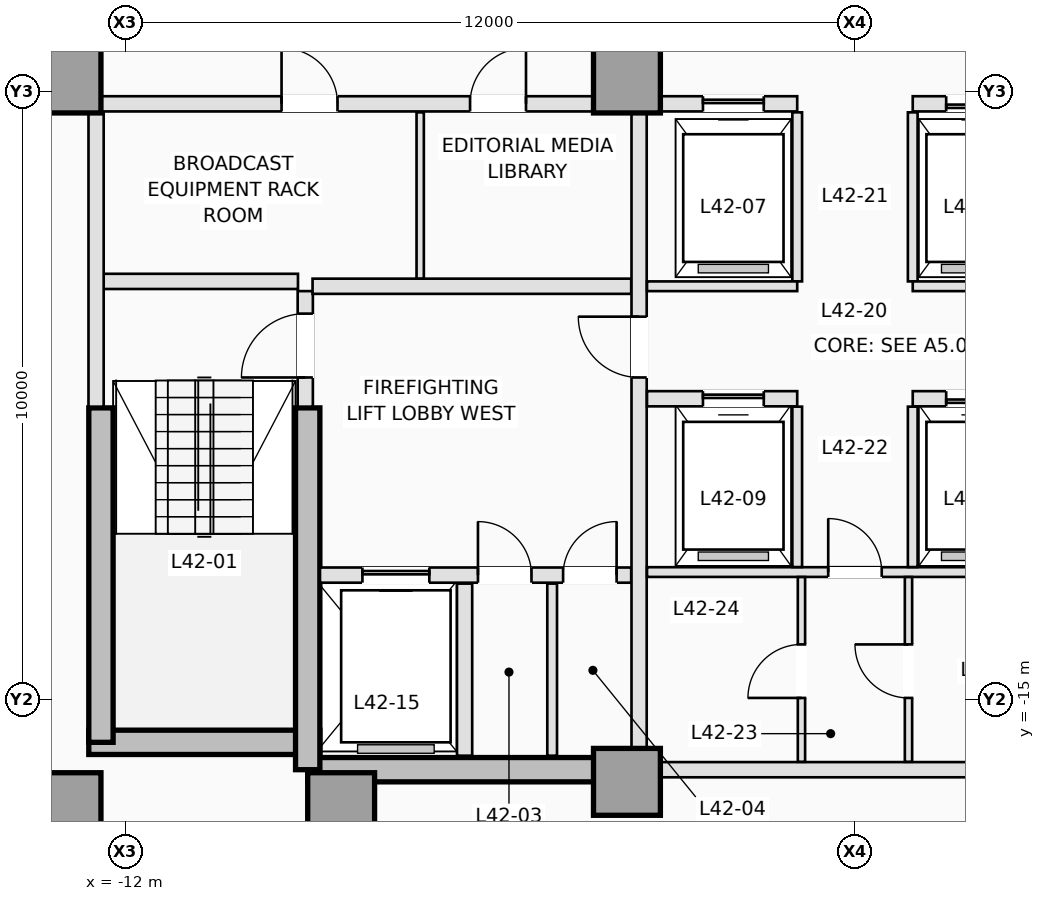
"""IFC4 building model, lengths in metres.
Left out: names, types, materials, properties, quantities, classifications, styles, units other than length and angle.
Written with IfcOpenShell. Run it as: python <this file> out.ifc"""

import sys

from ifc_helpers import new_model, si_unit, direction, frame, frame_2d, origin, origin_2d, place, context, subcontext, project, spatial, rectangle, extrude, element, fill, save


model = new_model("IFC4")
c1 = context("Model", 3, precision=1e-05, world=origin(), true_north=direction((0.0, 1.0)))
c2 = subcontext(c1, "Body", "Model", "MODEL_VIEW")
j1 = project(units=[si_unit("LENGTHUNIT", "METRE"), si_unit("PLANEANGLEUNIT", "RADIAN")], contexts=[c1])
p1 = place(None, origin())
s1 = spatial("IfcSite", under=j1, at=p1, CompositionType="ELEMENT")
p2 = place(p1, origin())
s2 = spatial("IfcBuilding", under=s1, at=p2, CompositionType="ELEMENT")
p3 = place(p2, frame((0.0, 0.0, 154.5)))
s3 = spatial("IfcBuildingStorey", under=s2, at=p3, CompositionType="ELEMENT", Elevation=154.5)
p4 = place(p3, frame((-12.6, -15.7, 0.0), z_axis=(0.0, 0.0, 1.0), x_axis=(1.0, 0.0, 0.0)))
e1 = element("IfcWall", 1, at=p4, inside=s3, PredefinedType="SHEAR", context=c2, shape_type="SweptSolid", body=[
    extrude(rectangle(XDim=3.8, YDim=0.4, at=frame_2d((1.9, 0.0))), origin(), (0.0, 0.0, 1.0), 3.5),
])
p5 = place(p3, frame((-9.0, -16.15, 0.0), z_axis=(0.0, 0.0, 1.0), x_axis=(1.0, 0.0, 0.0)))
e2 = element("IfcWall", 2, at=p5, inside=s3, PredefinedType="SHEAR", context=c2, shape_type="SweptSolid", body=[
    extrude(rectangle(XDim=5.25, YDim=0.4, at=frame_2d((2.625, 0.0))), origin(), (0.0, 0.0, 1.0), 3.5),
])
p6 = place(p3, frame((-12.4, -15.7, 0.0), z_axis=(0.0, 0.0, 1.0), x_axis=(0.0, 1.0, 0.0)))
e3 = element("IfcWall", 3, at=p6, inside=s3, PredefinedType="SHEAR", context=c2, shape_type="SweptSolid", body=[
    extrude(rectangle(XDim=5.5, YDim=0.4, at=frame_2d((2.75, 0.0))), origin(), (0.0, 0.0, 1.0), 3.5),
])
p7 = place(p3, frame((-9.0, -16.15, 0.0), z_axis=(0.0, 0.0, 1.0), x_axis=(0.0, 1.0, 0.0)))
e4 = element("IfcWall", 4, at=p7, inside=s3, PredefinedType="SHEAR", context=c2, shape_type="SweptSolid", body=[
    extrude(rectangle(XDim=5.95, YDim=0.4, at=frame_2d((2.975, 0.0))), origin(), (0.0, 0.0, 1.0), 3.5),
])
for number, where, z_axis, x_axis in (
    (5, (-12.95, -16.75, 0.0), (0.0, 0.0, 1.0), (1.0, 0.0, 0.0)),
    (6, (-8.45, -16.75, 0.0), (0.0, 0.0, 1.0), (1.0, 0.0, 0.0)),
    (7, (-3.75, -16.35, 0.0), (0.0, 0.0, 1.0), (1.0, 0.0, 0.0)),
    (8, (-12.95, -4.8, 0.0), (0.0, 0.0, 1.0), (1.0, 0.0, 0.0)),
    (9, (-3.75, -4.8, 0.0), (0.0, 0.0, 1.0), (1.0, 0.0, 0.0)),
):
    element("IfcColumn", number, at=place(p3, frame(where, z_axis=z_axis, x_axis=x_axis)), inside=s3, PredefinedType="COLUMN", context=c2, shape_type="SweptSolid", body=[
        extrude(rectangle(XDim=1.1, YDim=1.1, at=origin_2d()), origin(), (0.0, 0.0, 1.0), 3.5),
    ])
p8 = place(p3, frame((-9.04, -10.18, 0.0), z_axis=(0.0, 0.0, 1.0), x_axis=(0.0, 1.0, 0.0)))
e10 = element("IfcWall", 10, at=p8, inside=s3, PredefinedType="PARTITIONING", context=c2, shape_type="SweptSolid", body=[
    extrude(rectangle(XDim=1.9, YDim=0.25, at=frame_2d((0.95, 0.0))), origin(), (0.0, 0.0, 1.0), 3.25),
])
p9 = place(p8, frame((0.48, 0.0, 0.0)))
e11 = element("IfcOpeningElement", 11, at=p9, cuts=e10, PredefinedType="OPENING", context=c2, shape_type="SweptSolid", body=[
    extrude(rectangle(XDim=1.05, YDim=2.15, at=frame_2d((0.525, 1.075))), frame((0.0, 0.135, 0.0), z_axis=(0.0, -1.0, 0.0), x_axis=(1.0, 0.0, 0.0)), (0.0, 0.0, 1.0), 0.27),
])
p10 = place(p3, frame((-12.38, -8.12, 0.0), z_axis=(0.0, 0.0, 1.0), x_axis=(1.0, 0.0, 0.0)))
e12 = element("IfcWall", 12, at=p10, inside=s3, PredefinedType="PARTITIONING", context=c2, shape_type="SweptSolid", body=[
    extrude(rectangle(XDim=3.22, YDim=0.25, at=frame_2d((1.61, 0.0))), origin(), (0.0, 0.0, 1.0), 3.25),
])
p11 = place(p3, frame((-12.48, -10.18, 0.0), z_axis=(0.0, 0.0, 1.0), x_axis=(0.0, 1.0, 0.0)))
e13 = element("IfcWall", 13, at=p11, inside=s3, PredefinedType="PARTITIONING", context=c2, shape_type="SweptSolid", body=[
    extrude(rectangle(XDim=4.828, YDim=0.25, at=frame_2d((2.414, 0.0))), origin(), (0.0, 0.0, 1.0), 3.25),
])
p12 = place(p3, frame((-8.798, -12.95, 0.0), z_axis=(0.0, 0.0, 1.0), x_axis=(1.0, 0.0, 0.0)))
e14 = element("IfcWall", 14, at=p12, inside=s3, PredefinedType="PARTITIONING", context=c2, shape_type="SweptSolid", body=[
    extrude(rectangle(XDim=5.118, YDim=0.25, at=frame_2d((2.559, 0.0))), origin(), (0.0, 0.0, 1.0), 3.25),
])
p13 = place(p12, frame((0.698, 0.0, 0.0)))
e15 = element("IfcOpeningElement", 15, at=p13, cuts=e14, PredefinedType="OPENING", context=c2, shape_type="SweptSolid", body=[
    extrude(rectangle(XDim=1.1, YDim=2.15, at=frame_2d((0.55, 1.075))), frame((0.0, 0.135, 0.0), z_axis=(0.0, -1.0, 0.0), x_axis=(1.0, 0.0, 0.0)), (0.0, 0.0, 1.0), 0.27),
])
p14 = place(p12, frame((2.598, 0.0, 0.0)))
e16 = element("IfcOpeningElement", 16, at=p14, cuts=e14, PredefinedType="OPENING", context=c2, shape_type="SweptSolid", body=[
    extrude(rectangle(XDim=0.88, YDim=2.1, at=frame_2d((0.44, 1.05))), frame((0.0, 0.135, 0.0), z_axis=(0.0, -1.0, 0.0), x_axis=(1.0, 0.0, 0.0)), (0.0, 0.0, 1.0), 0.27),
])
p15 = place(p12, frame((3.998, 0.0, 0.0)))
e17 = element("IfcOpeningElement", 17, at=p15, cuts=e14, PredefinedType="OPENING", context=c2, shape_type="SweptSolid", body=[
    extrude(rectangle(XDim=0.88, YDim=2.1, at=frame_2d((0.44, 1.05))), frame((0.0, 0.135, 0.0), z_axis=(0.0, -1.0, 0.0), x_axis=(1.0, 0.0, 0.0)), (0.0, 0.0, 1.0), 0.27),
])
p16 = place(p3, frame((-6.42, -15.92, 0.0), z_axis=(0.0, 0.0, 1.0), x_axis=(0.0, 1.0, 0.0)))
e18 = element("IfcWall", 18, at=p16, inside=s3, PredefinedType="PARTITIONING", context=c2, shape_type="SweptSolid", body=[
    extrude(rectangle(XDim=2.83, YDim=0.25, at=frame_2d((1.415, 0.0))), origin(), (0.0, 0.0, 1.0), 3.25),
])
p17 = place(p3, frame((-4.98, -15.92, 0.0), z_axis=(0.0, 0.0, 1.0), x_axis=(0.0, 1.0, 0.0)))
e19 = element("IfcWall", 19, at=p17, inside=s3, PredefinedType="PARTITIONING", context=c2, shape_type="SweptSolid", body=[
    extrude(rectangle(XDim=2.83, YDim=0.16, at=frame_2d((1.415, 0.0))), origin(), (0.0, 0.0, 1.0), 3.25),
])
p18 = place(p3, frame((-8.92, -8.2, 0.0), z_axis=(0.0, 0.0, 1.0), x_axis=(1.0, 0.0, 0.0)))
e20 = element("IfcWall", 20, at=p18, inside=s3, PredefinedType="PARTITIONING", context=c2, shape_type="SweptSolid", body=[
    extrude(rectangle(XDim=5.24, YDim=0.25, at=frame_2d((2.62, 0.0))), origin(), (0.0, 0.0, 1.0), 3.25),
])
p19 = place(p3, frame((-3.55, -15.798, 0.0), z_axis=(0.0, 0.0, 1.0), x_axis=(0.0, 1.0, 0.0)))
e21 = element("IfcWall", 21, at=p19, inside=s3, PredefinedType="PARTITIONING", context=c2, shape_type="SweptSolid", body=[
    extrude(rectangle(XDim=10.446, YDim=0.25, at=frame_2d((5.223, 0.0))), origin(), (0.0, 0.0, 1.0), 3.25),
])
p20 = place(p19, frame((6.098, 0.0, 0.0)))
e22 = element("IfcOpeningElement", 22, at=p20, cuts=e21, PredefinedType="OPENING", context=c2, shape_type="SweptSolid", body=[
    extrude(rectangle(XDim=1.0, YDim=2.15, at=frame_2d((0.5, 1.075))), frame((0.0, 0.135, 0.0), z_axis=(0.0, -1.0, 0.0), x_axis=(1.0, 0.0, 0.0)), (0.0, 0.0, 1.0), 0.27),
])
p21 = place(p3, frame((-12.398, -5.2, 0.0), z_axis=(0.0, 0.0, 1.0), x_axis=(1.0, 0.0, 0.0)))
e23 = element("IfcWall", 23, at=p21, inside=s3, PredefinedType="PARTITIONING", context=c2, shape_type="SweptSolid", body=[
    extrude(rectangle(XDim=8.096, YDim=0.25, at=frame_2d((4.048, 0.0))), origin(), (0.0, 0.0, 1.0), 3.25),
])
p22 = place(p21, frame((2.968, 0.0, 0.0)))
e24 = element("IfcOpeningElement", 24, at=p22, cuts=e23, PredefinedType="OPENING", context=c2, shape_type="SweptSolid", body=[
    extrude(rectangle(XDim=0.92, YDim=2.12, at=frame_2d((0.46, 1.06))), frame((0.0, 0.135, 0.0), z_axis=(0.0, -1.0, 0.0), x_axis=(1.0, 0.0, 0.0)), (0.0, 0.0, 1.0), 0.27),
])
p23 = place(p21, frame((6.068, 0.0, 0.0)))
e25 = element("IfcOpeningElement", 25, at=p23, cuts=e23, PredefinedType="OPENING", context=c2, shape_type="SweptSolid", body=[
    extrude(rectangle(XDim=0.92, YDim=2.12, at=frame_2d((0.46, 1.06))), frame((0.0, 0.135, 0.0), z_axis=(0.0, -1.0, 0.0), x_axis=(1.0, 0.0, 0.0)), (0.0, 0.0, 1.0), 0.27),
])
p24 = place(p3, frame((-3.198, -5.2, 0.0), z_axis=(0.0, 0.0, 1.0), x_axis=(1.0, 0.0, 0.0)))
e26 = element("IfcWall", 26, at=p24, inside=s3, PredefinedType="PARTITIONING", context=c2, shape_type="SweptSolid", body=[
    extrude(rectangle(XDim=2.248, YDim=0.25, at=frame_2d((1.124, 0.0))), origin(), (0.0, 0.0, 1.0), 3.25),
])
p25 = place(p24, frame((0.698, 0.0, 0.0)))
e27 = element("IfcOpeningElement", 27, at=p25, cuts=e26, PredefinedType="OPENING", context=c2, shape_type="SweptSolid", body=[
    extrude(rectangle(XDim=1.0, YDim=2.15, at=frame_2d((0.5, 1.075))), frame((0.0, 0.135, 0.0), z_axis=(0.0, -1.0, 0.0), x_axis=(1.0, 0.0, 0.0)), (0.0, 0.0, 1.0), 0.27),
])
p26 = place(p3, frame((0.95, -5.2, 0.0), z_axis=(0.0, 0.0, 1.0), x_axis=(1.0, 0.0, 0.0)))
e28 = element("IfcWall", 28, at=p26, inside=s3, PredefinedType="PARTITIONING", context=c2, shape_type="SweptSolid", body=[
    extrude(rectangle(XDim=2.248, YDim=0.25, at=frame_2d((1.124, 0.0))), origin(), (0.0, 0.0, 1.0), 3.25),
])
p27 = place(p26, frame((0.55, 0.0, 0.0)))
e29 = element("IfcOpeningElement", 29, at=p27, cuts=e28, PredefinedType="OPENING", context=c2, shape_type="SweptSolid", body=[
    extrude(rectangle(XDim=1.0, YDim=2.15, at=frame_2d((0.5, 1.075))), frame((0.0, 0.135, 0.0), z_axis=(0.0, -1.0, 0.0), x_axis=(1.0, 0.0, 0.0)), (0.0, 0.0, 1.0), 0.27),
])
p28 = place(p3, frame((-7.15, -8.073, 0.0), z_axis=(0.0, 0.0, 1.0), x_axis=(0.0, 1.0, 0.0)))
e30 = element("IfcWall", 30, at=p28, inside=s3, PredefinedType="PARTITIONING", context=c2, shape_type="SweptSolid", body=[
    extrude(rectangle(XDim=2.733, YDim=0.12, at=frame_2d((1.366, 0.0))), origin(), (0.0, 0.0, 1.0), 3.25),
])
p29 = place(p3, frame((-3.198, -16.15, 0.0), z_axis=(0.0, 0.0, 1.0), x_axis=(1.0, 0.0, 0.0)))
e31 = element("IfcWall", 31, at=p29, inside=s3, PredefinedType="PARTITIONING", context=c2, shape_type="SweptSolid", body=[
    extrude(rectangle(XDim=6.396, YDim=0.25, at=frame_2d((3.198, 0.0))), origin(), (0.0, 0.0, 1.0), 2.45),
])
for number, where, z_axis, x_axis in (
    (32, (-0.95, -8.12, 0.0), (0.0, 0.0, 1.0), (0.0, 1.0, 0.0)),
    (33, (0.95, -8.12, 0.0), (0.0, 0.0, 1.0), (0.0, 1.0, 0.0)),
):
    element("IfcWall", number, at=place(p3, frame(where, z_axis=z_axis, x_axis=x_axis)), inside=s3, PredefinedType="PARTITIONING", context=c2, shape_type="SweptSolid", body=[
        extrude(rectangle(XDim=2.78, YDim=0.16, at=frame_2d((1.39, 0.0))), origin(), (0.0, 0.0, 1.0), 3.25),
    ])
for number, where, z_axis, x_axis in (
    (34, (-3.42, -8.2, 0.0), (0.0, 0.0, 1.0), (1.0, 0.0, 0.0)),
    (35, (0.95, -8.2, 0.0), (0.0, 0.0, 1.0), (1.0, 0.0, 0.0)),
):
    element("IfcWall", number, at=place(p3, frame(where, z_axis=z_axis, x_axis=x_axis)), inside=s3, PredefinedType="PARTITIONING", context=c2, shape_type="SweptSolid", body=[
        extrude(rectangle(XDim=2.47, YDim=0.16, at=frame_2d((1.235, 0.0))), origin(), (0.0, 0.0, 1.0), 3.25),
    ])
p30 = place(p3, frame((-3.42, -10.05, 0.0), z_axis=(0.0, 0.0, 1.0), x_axis=(1.0, 0.0, 0.0)))
e36 = element("IfcWall", 36, at=p30, inside=s3, PredefinedType="PARTITIONING", context=c2, shape_type="SweptSolid", body=[
    extrude(rectangle(XDim=2.47, YDim=0.25, at=frame_2d((1.235, 0.0))), origin(), (0.0, 0.0, 1.0), 3.25),
])
p31 = place(p30, frame((0.92, 0.0, 0.0)))
e37 = element("IfcOpeningElement", 37, at=p31, cuts=e36, PredefinedType="OPENING", context=c2, shape_type="SweptSolid", body=[
    extrude(rectangle(XDim=1.0, YDim=2.15, at=frame_2d((0.5, 1.075))), frame((0.0, 0.135, 0.0), z_axis=(0.0, -1.0, 0.0), x_axis=(1.0, 0.0, 0.0)), (0.0, 0.0, 1.0), 0.27),
])
p32 = place(p3, frame((0.95, -10.05, 0.0), z_axis=(0.0, 0.0, 1.0), x_axis=(1.0, 0.0, 0.0)))
e38 = element("IfcWall", 38, at=p32, inside=s3, PredefinedType="PARTITIONING", context=c2, shape_type="SweptSolid", body=[
    extrude(rectangle(XDim=2.47, YDim=0.25, at=frame_2d((1.235, 0.0))), origin(), (0.0, 0.0, 1.0), 3.25),
])
p33 = place(p32, frame((0.55, 0.0, 0.0)))
e39 = element("IfcOpeningElement", 39, at=p33, cuts=e38, PredefinedType="OPENING", context=c2, shape_type="SweptSolid", body=[
    extrude(rectangle(XDim=1.0, YDim=2.15, at=frame_2d((0.5, 1.075))), frame((0.0, 0.135, 0.0), z_axis=(0.0, -1.0, 0.0), x_axis=(1.0, 0.0, 0.0)), (0.0, 0.0, 1.0), 0.27),
])
p34 = place(p3, frame((-3.42, -12.9, 0.0), z_axis=(0.0, 0.0, 1.0), x_axis=(1.0, 0.0, 0.0)))
e40 = element("IfcWall", 40, at=p34, inside=s3, PredefinedType="PARTITIONING", context=c2, shape_type="SweptSolid", body=[
    extrude(rectangle(XDim=6.84, YDim=0.16, at=frame_2d((3.42, 0.0))), origin(), (0.0, 0.0, 1.0), 3.25),
])
p35 = place(p34, frame((2.98, 0.0, 0.0)))
e41 = element("IfcOpeningElement", 41, at=p35, cuts=e40, PredefinedType="OPENING", context=c2, shape_type="SweptSolid", body=[
    extrude(rectangle(XDim=0.88, YDim=2.12, at=frame_2d((0.44, 1.06))), frame((0.0, 0.09, 0.0), z_axis=(0.0, -1.0, 0.0), x_axis=(1.0, 0.0, 0.0)), (0.0, 0.0, 1.0), 0.18),
])
for number, where, z_axis, x_axis in (
    (42, (-0.95, -12.818, 0.0), (0.0, 0.0, 1.0), (0.0, 1.0, 0.0)),
    (43, (0.95, -12.818, 0.0), (0.0, 0.0, 1.0), (0.0, 1.0, 0.0)),
):
    element("IfcWall", number, at=place(p3, frame(where, z_axis=z_axis, x_axis=x_axis)), inside=s3, PredefinedType="PARTITIONING", context=c2, shape_type="SweptSolid", body=[
        extrude(rectangle(XDim=2.638, YDim=0.16, at=frame_2d((1.319, 0.0))), origin(), (0.0, 0.0, 1.0), 3.25),
    ])
p36 = place(p3, frame((-0.88, -16.02, 0.0), z_axis=(0.0, 0.0, 1.0), x_axis=(0.0, 1.0, 0.0)))
e44 = element("IfcWall", 44, at=p36, inside=s3, PredefinedType="PARTITIONING", context=c2, shape_type="SweptSolid", body=[
    extrude(rectangle(XDim=3.038, YDim=0.12, at=frame_2d((1.519, 0.0))), origin(), (0.0, 0.0, 1.0), 3.25),
])
p37 = place(p36, frame((1.05, 0.0, 0.0)))
e45 = element("IfcOpeningElement", 45, at=p37, cuts=e44, PredefinedType="OPENING", context=c2, shape_type="SweptSolid", body=[
    extrude(rectangle(XDim=0.88, YDim=2.12, at=frame_2d((0.44, 1.06))), frame((0.0, 0.07, 0.0), z_axis=(0.0, -1.0, 0.0), x_axis=(1.0, 0.0, 0.0)), (0.0, 0.0, 1.0), 0.14),
])
p38 = place(p3, frame((0.88, -16.02, 0.0), z_axis=(0.0, 0.0, 1.0), x_axis=(0.0, 1.0, 0.0)))
e46 = element("IfcWall", 46, at=p38, inside=s3, PredefinedType="PARTITIONING", context=c2, shape_type="SweptSolid", body=[
    extrude(rectangle(XDim=3.038, YDim=0.12, at=frame_2d((1.519, 0.0))), origin(), (0.0, 0.0, 1.0), 3.25),
])
p39 = place(p38, frame((1.05, 0.0, 0.0)))
e47 = element("IfcOpeningElement", 47, at=p39, cuts=e46, PredefinedType="OPENING", context=c2, shape_type="SweptSolid", body=[
    extrude(rectangle(XDim=0.88, YDim=2.12, at=frame_2d((0.44, 1.06))), frame((0.0, 0.07, 0.0), z_axis=(0.0, -1.0, 0.0), x_axis=(1.0, 0.0, 0.0)), (0.0, 0.0, 1.0), 0.14),
])
p40 = place(p25, origin())
e48 = element("IfcDoor", 48, at=p40, inside=s3, OperationType="SLIDING_TO_LEFT", PredefinedType="DOOR", context=c2, shape_type="SweptSolid", body=[
    extrude(rectangle(XDim=1.0, YDim=2.15, at=frame_2d((0.5, 1.075))), frame((0.0, 0.025, 0.0), z_axis=(0.0, -1.0, 0.0), x_axis=(1.0, 0.0, 0.0)), (0.0, 0.0, 1.0), 0.05),
])
fill(e27, e48)
p41 = place(p27, origin())
e49 = element("IfcDoor", 49, at=p41, inside=s3, OperationType="SLIDING_TO_RIGHT", PredefinedType="DOOR", context=c2, shape_type="SweptSolid", body=[
    extrude(rectangle(XDim=1.0, YDim=2.15, at=frame_2d((0.5, 1.075))), frame((0.0, 0.025, 0.0), z_axis=(0.0, -1.0, 0.0), x_axis=(1.0, 0.0, 0.0)), (0.0, 0.0, 1.0), 0.05),
])
fill(e29, e49)
p42 = place(p13, origin())
e50 = element("IfcDoor", 50, at=p42, inside=s3, OperationType="SLIDING_TO_LEFT", PredefinedType="DOOR", context=c2, shape_type="SweptSolid", body=[
    extrude(rectangle(XDim=1.1, YDim=2.15, at=frame_2d((0.55, 1.075))), frame((0.0, 0.025, 0.0), z_axis=(0.0, -1.0, 0.0), x_axis=(1.0, 0.0, 0.0)), (0.0, 0.0, 1.0), 0.05),
])
fill(e15, e50)
p43 = place(p31, origin())
e51 = element("IfcDoor", 51, at=p43, inside=s3, OperationType="SLIDING_TO_LEFT", PredefinedType="DOOR", context=c2, shape_type="SweptSolid", body=[
    extrude(rectangle(XDim=1.0, YDim=2.15, at=frame_2d((0.5, 1.075))), frame((0.0, 0.025, 0.0), z_axis=(0.0, -1.0, 0.0), x_axis=(1.0, 0.0, 0.0)), (0.0, 0.0, 1.0), 0.05),
])
fill(e37, e51)
p44 = place(p33, origin())
e52 = element("IfcDoor", 52, at=p44, inside=s3, OperationType="SLIDING_TO_RIGHT", PredefinedType="DOOR", context=c2, shape_type="SweptSolid", body=[
    extrude(rectangle(XDim=1.0, YDim=2.15, at=frame_2d((0.5, 1.075))), frame((0.0, 0.025, 0.0), z_axis=(0.0, -1.0, 0.0), x_axis=(1.0, 0.0, 0.0)), (0.0, 0.0, 1.0), 0.05),
])
fill(e39, e52)
p45 = place(p9, origin())
e53 = element("IfcDoor", 53, at=p45, inside=s3, OperationType="SINGLE_SWING_LEFT", PredefinedType="DOOR", context=c2, shape_type="SweptSolid", body=[
    extrude(rectangle(XDim=1.05, YDim=2.15, at=frame_2d((0.525, 1.075))), frame((0.0, 0.025, 0.0), z_axis=(0.0, -1.0, 0.0), x_axis=(1.0, 0.0, 0.0)), (0.0, 0.0, 1.0), 0.05),
])
fill(e11, e53)
p46 = place(p14, origin())
e54 = element("IfcDoor", 54, at=p46, inside=s3, OperationType="SINGLE_SWING_LEFT", PredefinedType="TRAPDOOR", context=c2, shape_type="SweptSolid", body=[
    extrude(rectangle(XDim=0.88, YDim=2.1, at=frame_2d((0.44, 1.05))), frame((0.0, 0.025, 0.0), z_axis=(0.0, -1.0, 0.0), x_axis=(1.0, 0.0, 0.0)), (0.0, 0.0, 1.0), 0.05),
])
fill(e16, e54)
p47 = place(p15, origin())
e55 = element("IfcDoor", 55, at=p47, inside=s3, OperationType="SINGLE_SWING_RIGHT", PredefinedType="TRAPDOOR", context=c2, shape_type="SweptSolid", body=[
    extrude(rectangle(XDim=0.88, YDim=2.1, at=frame_2d((0.44, 1.05))), frame((0.0, 0.025, 0.0), z_axis=(0.0, -1.0, 0.0), x_axis=(1.0, 0.0, 0.0)), (0.0, 0.0, 1.0), 0.05),
])
fill(e17, e55)
p48 = place(p20, origin())
e56 = element("IfcDoor", 56, at=p48, inside=s3, OperationType="SINGLE_SWING_RIGHT", PredefinedType="DOOR", context=c2, shape_type="SweptSolid", body=[
    extrude(rectangle(XDim=1.0, YDim=2.15, at=frame_2d((0.5, 1.075))), frame((0.0, 0.025, 0.0), z_axis=(0.0, -1.0, 0.0), x_axis=(1.0, 0.0, 0.0)), (0.0, 0.0, 1.0), 0.05),
])
fill(e22, e56)
p49 = place(p22, origin())
e57 = element("IfcDoor", 57, at=p49, inside=s3, OperationType="SINGLE_SWING_LEFT", PredefinedType="DOOR", context=c2, shape_type="SweptSolid", body=[
    extrude(rectangle(XDim=0.92, YDim=2.12, at=frame_2d((0.46, 1.06))), frame((0.0, 0.025, 0.0), z_axis=(0.0, -1.0, 0.0), x_axis=(1.0, 0.0, 0.0)), (0.0, 0.0, 1.0), 0.05),
])
fill(e24, e57)
p50 = place(p23, origin())
e58 = element("IfcDoor", 58, at=p50, inside=s3, OperationType="SINGLE_SWING_RIGHT", PredefinedType="DOOR", context=c2, shape_type="SweptSolid", body=[
    extrude(rectangle(XDim=0.92, YDim=2.12, at=frame_2d((0.46, 1.06))), frame((0.0, 0.025, 0.0), z_axis=(0.0, -1.0, 0.0), x_axis=(1.0, 0.0, 0.0)), (0.0, 0.0, 1.0), 0.05),
])
fill(e25, e58)
p51 = place(p35, origin())
e59 = element("IfcDoor", 59, at=p51, inside=s3, OperationType="SINGLE_SWING_LEFT", PredefinedType="DOOR", context=c2, shape_type="SweptSolid", body=[
    extrude(rectangle(XDim=0.88, YDim=2.12, at=frame_2d((0.44, 1.06))), frame((0.0, 0.025, 0.0), z_axis=(0.0, -1.0, 0.0), x_axis=(1.0, 0.0, 0.0)), (0.0, 0.0, 1.0), 0.05),
])
fill(e41, e59)
p52 = place(p37, origin())
e60 = element("IfcDoor", 60, at=p52, inside=s3, OperationType="SINGLE_SWING_LEFT", PredefinedType="DOOR", context=c2, shape_type="SweptSolid", body=[
    extrude(rectangle(XDim=0.88, YDim=2.12, at=frame_2d((0.44, 1.06))), frame((0.0, 0.025, 0.0), z_axis=(0.0, -1.0, 0.0), x_axis=(1.0, 0.0, 0.0)), (0.0, 0.0, 1.0), 0.05),
])
fill(e45, e60)
p53 = place(p39, origin())
e61 = element("IfcDoor", 61, at=p53, inside=s3, OperationType="SINGLE_SWING_RIGHT", PredefinedType="DOOR", context=c2, shape_type="SweptSolid", body=[
    extrude(rectangle(XDim=0.88, YDim=2.12, at=frame_2d((0.44, 1.06))), frame((0.0, 0.025, 0.0), z_axis=(0.0, -1.0, 0.0), x_axis=(1.0, 0.0, 0.0)), (0.0, 0.0, 1.0), 0.05),
])
fill(e47, e61)
save(model, sys.argv[1])
